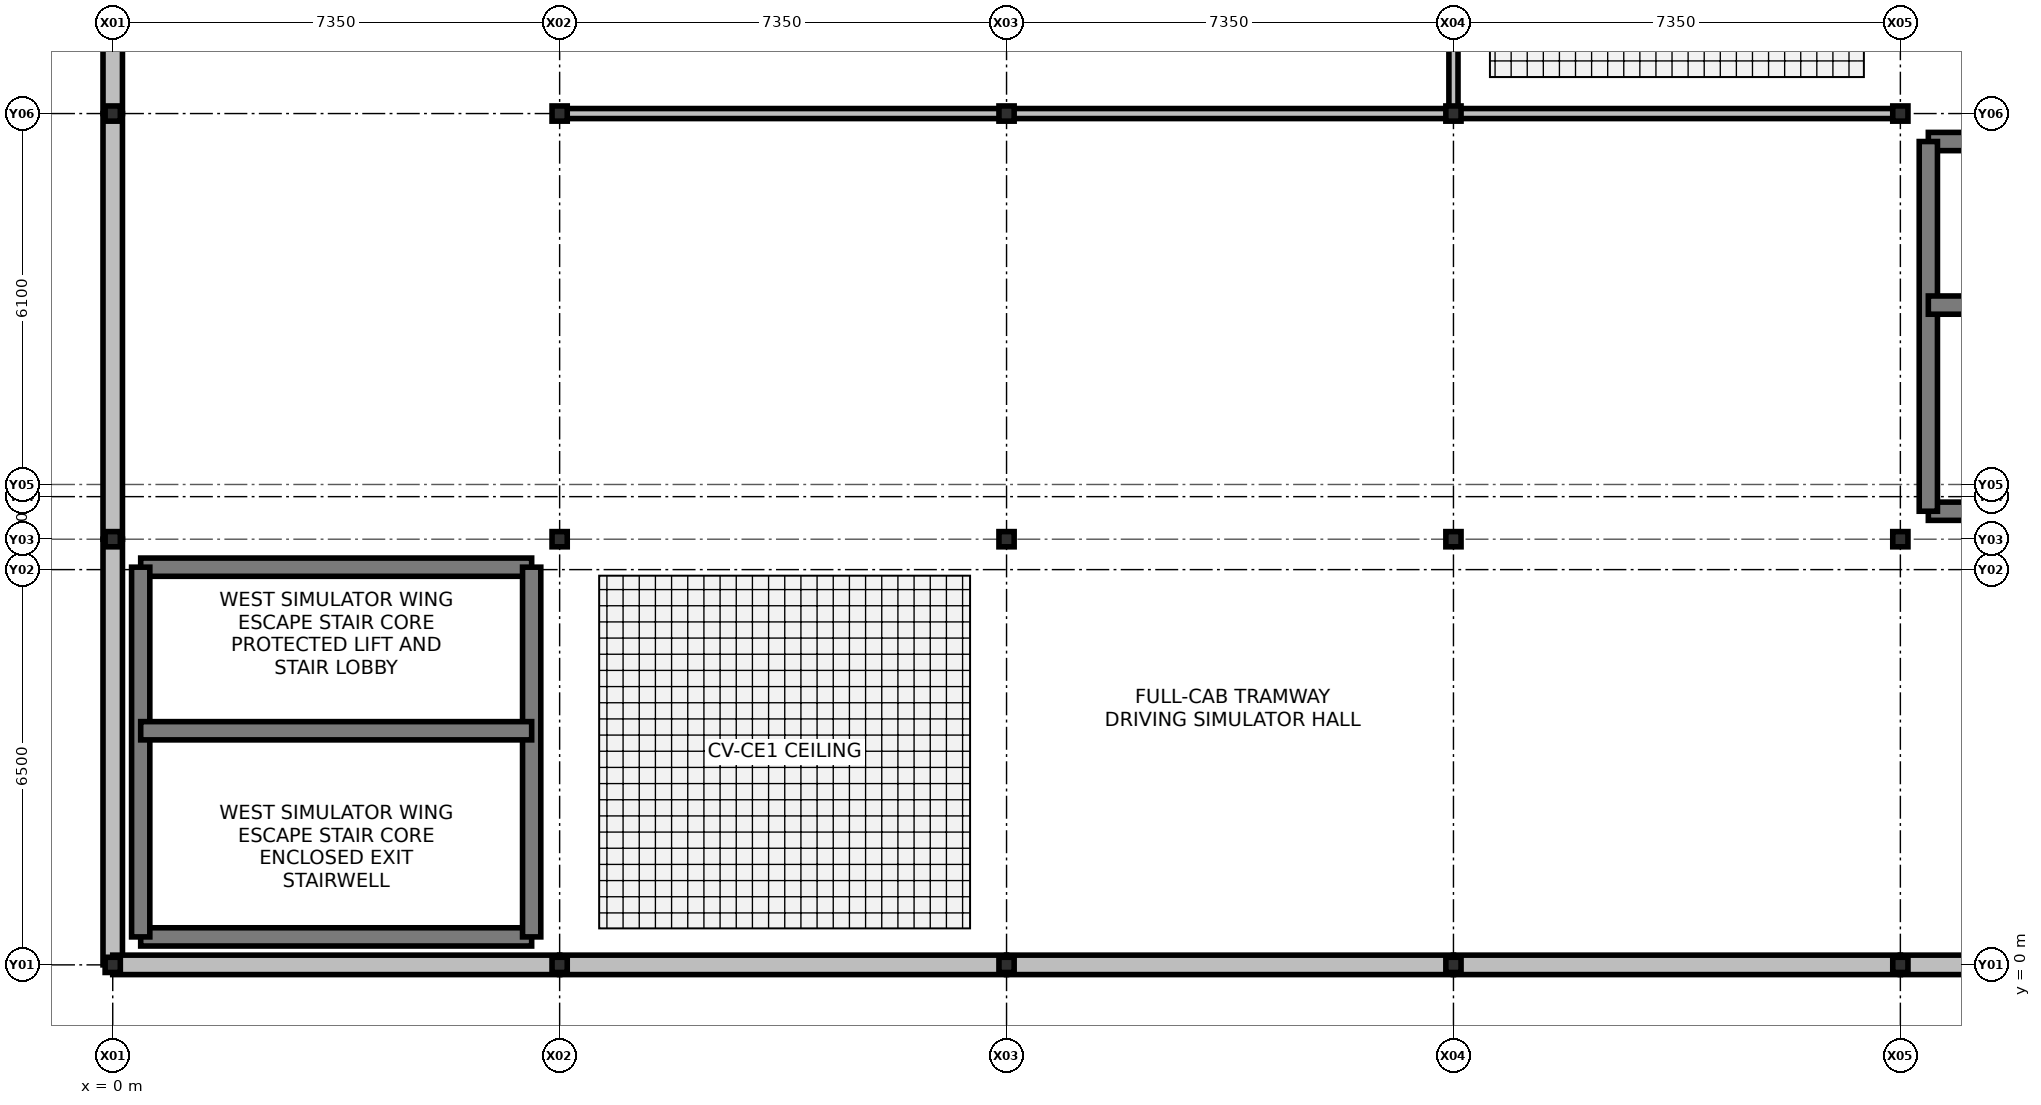
"""IFC4 building model, lengths in metres.
Left out: names, types, materials, properties, quantities, classifications, styles, units other than length and angle.
Written with IfcOpenShell. Run it as: python <this file> out.ifc"""

import sys

from ifc_helpers import new_model, si_unit, direction, frame, frame_2d, origin, origin_with_axes, origin_2d, place, context, subcontext, project, spatial, rectangle, i_section, extrude, element, fill, save


model = new_model("IFC4")
c1 = context("Model", 3, precision=1e-05, world=origin(), true_north=direction((0.0, 1.0)))
c2 = subcontext(c1, "Body", "Model", "MODEL_VIEW")
j1 = project(units=[si_unit("LENGTHUNIT", "METRE"), si_unit("PLANEANGLEUNIT", "RADIAN")], contexts=[c1])
p1 = place(None, origin())
s1 = spatial("IfcSite", under=j1, at=p1, CompositionType="ELEMENT")
p2 = place(p1, origin())
s2 = spatial("IfcBuilding", under=s1, at=p2, CompositionType="ELEMENT")
p3 = place(p2, frame((0.0, 0.0, 15.3)))
s3 = spatial("IfcBuildingStorey", under=s2, at=p3, CompositionType="ELEMENT", Elevation=15.3)
for number, where, z_axis, x_axis in (
    (1, (0.0, 0.0, 0.0), (0.0, 0.0, 1.0), (1.0, 0.0, 0.0)),
    (2, (0.0, 7.0, 0.0), (0.0, 0.0, 1.0), (1.0, 0.0, 0.0)),
    (3, (0.0, 14.0, 0.0), (0.0, 0.0, 1.0), (1.0, 0.0, 0.0)),
    (4, (7.35, 0.0, 0.0), (0.0, 0.0, 1.0), (1.0, 0.0, 0.0)),
    (5, (7.35, 7.0, 0.0), (0.0, 0.0, 1.0), (1.0, 0.0, 0.0)),
    (6, (7.35, 14.0, 0.0), (0.0, 0.0, 1.0), (1.0, 0.0, 0.0)),
    (7, (14.7, 0.0, 0.0), (0.0, 0.0, 1.0), (1.0, 0.0, 0.0)),
    (8, (14.7, 7.0, 0.0), (0.0, 0.0, 1.0), (1.0, 0.0, 0.0)),
    (9, (14.7, 14.0, 0.0), (0.0, 0.0, 1.0), (1.0, 0.0, 0.0)),
    (10, (22.05, 0.0, 0.0), (0.0, 0.0, 1.0), (1.0, 0.0, 0.0)),
    (11, (22.05, 7.0, 0.0), (0.0, 0.0, 1.0), (1.0, 0.0, 0.0)),
    (12, (22.05, 14.0, 0.0), (0.0, 0.0, 1.0), (1.0, 0.0, 0.0)),
    (13, (29.4, 0.0, 0.0), (0.0, 0.0, 1.0), (1.0, 0.0, 0.0)),
    (14, (29.4, 7.0, 0.0), (0.0, 0.0, 1.0), (1.0, 0.0, 0.0)),
    (15, (29.4, 14.0, 0.0), (0.0, 0.0, 1.0), (1.0, 0.0, 0.0)),
):
    element("IfcColumn", number, at=place(p3, frame(where, z_axis=z_axis, x_axis=x_axis)), inside=s3, PredefinedType="COLUMN", context=c2, shape_type="SweptSolid", body=[
        extrude(i_section(OverallWidth=0.25, OverallDepth=0.25, WebThickness=0.009, FlangeThickness=0.014, at=origin_2d()), origin(), (0.0, 0.0, 1.0), 4.2),
    ])
p4 = place(p3, frame((0.0, 0.0, 0.0), z_axis=(0.0, 0.0, 1.0), x_axis=(0.0, 1.0, 0.0)))
e16 = element("IfcWall", 16, at=p4, inside=s3, PredefinedType="SOLIDWALL", context=c2, shape_type="SweptSolid", body=[
    extrude(rectangle(XDim=7.0, YDim=0.32, at=frame_2d((3.5, 0.0))), origin(), (0.0, 0.0, 1.0), 3.45),
])
p5 = place(p4, frame((2.2, 0.0, 0.9)))
e17 = element("IfcOpeningElement", 17, at=p5, cuts=e16, PredefinedType="OPENING", context=c2, shape_type="SweptSolid", body=[
    extrude(rectangle(XDim=2.45, YDim=2.05, at=frame_2d((1.225, 1.025))), frame((0.0, 0.17, 0.0), z_axis=(0.0, -1.0, 0.0), x_axis=(1.0, 0.0, 0.0)), (0.0, 0.0, 1.0), 0.34),
])
p6 = place(p3, frame((0.0, 7.0, 0.0), z_axis=(0.0, 0.0, 1.0), x_axis=(0.0, 1.0, 0.0)))
e18 = element("IfcWall", 18, at=p6, inside=s3, PredefinedType="SOLIDWALL", context=c2, shape_type="SweptSolid", body=[
    extrude(rectangle(XDim=7.0, YDim=0.32, at=frame_2d((3.5, 0.0))), origin(), (0.0, 0.0, 1.0), 3.45),
])
p7 = place(p6, frame((2.2, 0.0, 0.9)))
e19 = element("IfcOpeningElement", 19, at=p7, cuts=e18, PredefinedType="OPENING", context=c2, shape_type="SweptSolid", body=[
    extrude(rectangle(XDim=3.15, YDim=1.95, at=frame_2d((1.575, 0.975))), frame((0.0, 0.17, 0.0), z_axis=(0.0, -1.0, 0.0), x_axis=(1.0, 0.0, 0.0)), (0.0, 0.0, 1.0), 0.34),
])
p8 = place(p3, frame((0.0, 14.0, 0.0), z_axis=(0.0, 0.0, 1.0), x_axis=(0.0, 1.0, 0.0)))
e20 = element("IfcWall", 20, at=p8, inside=s3, PredefinedType="SOLIDWALL", context=c2, shape_type="SweptSolid", body=[
    extrude(rectangle(XDim=7.0, YDim=0.32, at=frame_2d((3.5, 0.0))), origin(), (0.0, 0.0, 1.0), 3.45),
])
p9 = place(p8, frame((2.2, 0.0, 0.9)))
e21 = element("IfcOpeningElement", 21, at=p9, cuts=e20, PredefinedType="OPENING", context=c2, shape_type="SweptSolid", body=[
    extrude(rectangle(XDim=1.4, YDim=1.6, at=frame_2d((0.7, 0.8))), frame((0.0, 0.17, 0.0), z_axis=(0.0, -1.0, 0.0), x_axis=(1.0, 0.0, 0.0)), (0.0, 0.0, 1.0), 0.34),
])
p10 = place(p3, origin_with_axes())
e22 = element("IfcWall", 22, at=p10, inside=s3, PredefinedType="SOLIDWALL", context=c2, shape_type="SweptSolid", body=[
    extrude(rectangle(XDim=7.35, YDim=0.32, at=frame_2d((3.675, 0.0))), origin(), (0.0, 0.0, 1.0), 3.45),
])
p11 = place(p10, frame((2.4, 0.0, 0.9)))
e23 = element("IfcOpeningElement", 23, at=p11, cuts=e22, PredefinedType="OPENING", context=c2, shape_type="SweptSolid", body=[
    extrude(rectangle(XDim=2.1, YDim=2.1, at=frame_2d((1.05, 1.05))), frame((0.0, 0.17, 0.0), z_axis=(0.0, -1.0, 0.0), x_axis=(1.0, 0.0, 0.0)), (0.0, 0.0, 1.0), 0.34),
])
p12 = place(p3, frame((7.35, 0.0, 0.0), z_axis=(0.0, 0.0, 1.0), x_axis=(1.0, 0.0, 0.0)))
e24 = element("IfcWall", 24, at=p12, inside=s3, PredefinedType="SOLIDWALL", context=c2, shape_type="SweptSolid", body=[
    extrude(rectangle(XDim=7.35, YDim=0.32, at=frame_2d((3.675, 0.0))), origin(), (0.0, 0.0, 1.0), 3.45),
])
p13 = place(p12, frame((2.4, 0.0, 0.9)))
e25 = element("IfcOpeningElement", 25, at=p13, cuts=e24, PredefinedType="OPENING", context=c2, shape_type="SweptSolid", body=[
    extrude(rectangle(XDim=2.4, YDim=1.8, at=frame_2d((1.2, 0.9))), frame((0.0, 0.17, 0.0), z_axis=(0.0, -1.0, 0.0), x_axis=(1.0, 0.0, 0.0)), (0.0, 0.0, 1.0), 0.34),
])
p14 = place(p3, frame((14.7, 0.0, 0.0), z_axis=(0.0, 0.0, 1.0), x_axis=(1.0, 0.0, 0.0)))
e26 = element("IfcWall", 26, at=p14, inside=s3, PredefinedType="SOLIDWALL", context=c2, shape_type="SweptSolid", body=[
    extrude(rectangle(XDim=7.35, YDim=0.32, at=frame_2d((3.675, 0.0))), origin(), (0.0, 0.0, 1.0), 3.45),
])
p15 = place(p14, frame((2.4, 0.0, 0.9)))
e27 = element("IfcOpeningElement", 27, at=p15, cuts=e26, PredefinedType="OPENING", context=c2, shape_type="SweptSolid", body=[
    extrude(rectangle(XDim=2.4, YDim=2.1, at=frame_2d((1.2, 1.05))), frame((0.0, 0.17, 0.0), z_axis=(0.0, -1.0, 0.0), x_axis=(1.0, 0.0, 0.0)), (0.0, 0.0, 1.0), 0.34),
])
p16 = place(p3, frame((22.05, 0.0, 0.0), z_axis=(0.0, 0.0, 1.0), x_axis=(1.0, 0.0, 0.0)))
e28 = element("IfcWall", 28, at=p16, inside=s3, PredefinedType="SOLIDWALL", context=c2, shape_type="SweptSolid", body=[
    extrude(rectangle(XDim=7.35, YDim=0.32, at=frame_2d((3.675, 0.0))), origin(), (0.0, 0.0, 1.0), 3.45),
])
p17 = place(p16, frame((2.4, 0.0, 0.9)))
e29 = element("IfcOpeningElement", 29, at=p17, cuts=e28, PredefinedType="OPENING", context=c2, shape_type="SweptSolid", body=[
    extrude(rectangle(XDim=2.6, YDim=2.0, at=frame_2d((1.3, 1.0))), frame((0.0, 0.17, 0.0), z_axis=(0.0, -1.0, 0.0), x_axis=(1.0, 0.0, 0.0)), (0.0, 0.0, 1.0), 0.34),
])
p18 = place(p3, frame((29.4, 0.0, 0.0), z_axis=(0.0, 0.0, 1.0), x_axis=(1.0, 0.0, 0.0)))
e30 = element("IfcWall", 30, at=p18, inside=s3, PredefinedType="SOLIDWALL", context=c2, shape_type="SweptSolid", body=[
    extrude(rectangle(XDim=7.35, YDim=0.32, at=frame_2d((3.675, 0.0))), origin(), (0.0, 0.0, 1.0), 3.45),
])
p19 = place(p18, frame((2.4, 0.0, 0.9)))
e31 = element("IfcOpeningElement", 31, at=p19, cuts=e30, PredefinedType="OPENING", context=c2, shape_type="SweptSolid", body=[
    extrude(rectangle(XDim=2.8, YDim=2.1, at=frame_2d((1.4, 1.05))), frame((0.0, 0.17, 0.0), z_axis=(0.0, -1.0, 0.0), x_axis=(1.0, 0.0, 0.0)), (0.0, 0.0, 1.0), 0.34),
])
p20 = place(p3, frame((29.86, 7.46, 0.0), z_axis=(0.0, 0.0, 1.0), x_axis=(1.0, 0.0, 0.0)))
e32 = element("IfcWall", 32, at=p20, inside=s3, PredefinedType="SHEAR", context=c2, shape_type="SweptSolid", body=[
    extrude(rectangle(XDim=6.43, YDim=0.3, at=frame_2d((3.215, 0.0))), origin(), (0.0, 0.0, 1.0), 3.92),
])
p21 = place(p3, frame((29.86, 13.54, 0.0), z_axis=(0.0, 0.0, 1.0), x_axis=(1.0, 0.0, 0.0)))
e33 = element("IfcWall", 33, at=p21, inside=s3, PredefinedType="SHEAR", context=c2, shape_type="SweptSolid", body=[
    extrude(rectangle(XDim=6.43, YDim=0.3, at=frame_2d((3.215, 0.0))), origin(), (0.0, 0.0, 1.0), 3.92),
])
p22 = place(p21, frame((0.55, 0.0, 0.0)))
e34 = element("IfcOpeningElement", 34, at=p22, cuts=e33, PredefinedType="OPENING", context=c2, shape_type="SweptSolid", body=[
    extrude(rectangle(XDim=1.5, YDim=2.2, at=frame_2d((0.75, 1.1))), frame((0.0, 0.16, 0.0), z_axis=(0.0, -1.0, 0.0), x_axis=(1.0, 0.0, 0.0)), (0.0, 0.0, 1.0), 0.32),
])
p23 = place(p3, frame((29.86, 7.46, 0.0), z_axis=(0.0, 0.0, 1.0), x_axis=(0.0, 1.0, 0.0)))
e35 = element("IfcWall", 35, at=p23, inside=s3, PredefinedType="SHEAR", context=c2, shape_type="SweptSolid", body=[
    extrude(rectangle(XDim=6.08, YDim=0.3, at=frame_2d((3.04, 0.0))), origin(), (0.0, 0.0, 1.0), 3.92),
])
p24 = place(p3, frame((29.86, 10.85, 0.0), z_axis=(0.0, 0.0, 1.0), x_axis=(1.0, 0.0, 0.0)))
e36 = element("IfcWall", 36, at=p24, inside=s3, PredefinedType="SHEAR", context=c2, shape_type="SweptSolid", body=[
    extrude(rectangle(XDim=6.43, YDim=0.3, at=frame_2d((3.215, 0.0))), origin(), (0.0, 0.0, 1.0), 3.92),
])
p25 = place(p24, frame((0.185, 0.0, 0.0)))
e37 = element("IfcOpeningElement", 37, at=p25, cuts=e36, PredefinedType="OPENING", context=c2, shape_type="SweptSolid", body=[
    extrude(rectangle(XDim=1.05, YDim=2.15, at=frame_2d((0.525, 1.075))), frame((0.0, 0.16, 0.0), z_axis=(0.0, -1.0, 0.0), x_axis=(1.0, 0.0, 0.0)), (0.0, 0.0, 1.0), 0.32),
])
p26 = place(p3, frame((0.46, 0.46, 0.0), z_axis=(0.0, 0.0, 1.0), x_axis=(1.0, 0.0, 0.0)))
e38 = element("IfcWall", 38, at=p26, inside=s3, PredefinedType="SHEAR", context=c2, shape_type="SweptSolid", body=[
    extrude(rectangle(XDim=6.43, YDim=0.3, at=frame_2d((3.215, 0.0))), origin(), (0.0, 0.0, 1.0), 3.92),
])
p27 = place(p3, frame((0.46, 6.54, 0.0), z_axis=(0.0, 0.0, 1.0), x_axis=(1.0, 0.0, 0.0)))
e39 = element("IfcWall", 39, at=p27, inside=s3, PredefinedType="SHEAR", context=c2, shape_type="SweptSolid", body=[
    extrude(rectangle(XDim=6.43, YDim=0.3, at=frame_2d((3.215, 0.0))), origin(), (0.0, 0.0, 1.0), 3.92),
])
p28 = place(p27, frame((0.55, 0.0, 0.0)))
e40 = element("IfcOpeningElement", 40, at=p28, cuts=e39, PredefinedType="OPENING", context=c2, shape_type="SweptSolid", body=[
    extrude(rectangle(XDim=1.5, YDim=2.2, at=frame_2d((0.75, 1.1))), frame((0.0, 0.16, 0.0), z_axis=(0.0, -1.0, 0.0), x_axis=(1.0, 0.0, 0.0)), (0.0, 0.0, 1.0), 0.32),
])
for number, where, z_axis, x_axis in (
    (41, (0.46, 0.46, 0.0), (0.0, 0.0, 1.0), (0.0, 1.0, 0.0)),
    (42, (6.89, 0.46, 0.0), (0.0, 0.0, 1.0), (0.0, 1.0, 0.0)),
):
    element("IfcWall", number, at=place(p3, frame(where, z_axis=z_axis, x_axis=x_axis)), inside=s3, PredefinedType="SHEAR", context=c2, shape_type="SweptSolid", body=[
        extrude(rectangle(XDim=6.08, YDim=0.3, at=frame_2d((3.04, 0.0))), origin(), (0.0, 0.0, 1.0), 3.92),
    ])
p29 = place(p3, frame((0.46, 3.85, 0.0), z_axis=(0.0, 0.0, 1.0), x_axis=(1.0, 0.0, 0.0)))
e43 = element("IfcWall", 43, at=p29, inside=s3, PredefinedType="SHEAR", context=c2, shape_type="SweptSolid", body=[
    extrude(rectangle(XDim=6.43, YDim=0.3, at=frame_2d((3.215, 0.0))), origin(), (0.0, 0.0, 1.0), 3.92),
])
p30 = place(p29, frame((0.185, 0.0, 0.0)))
e44 = element("IfcOpeningElement", 44, at=p30, cuts=e43, PredefinedType="OPENING", context=c2, shape_type="SweptSolid", body=[
    extrude(rectangle(XDim=1.05, YDim=2.15, at=frame_2d((0.525, 1.075))), frame((0.0, 0.16, 0.0), z_axis=(0.0, -1.0, 0.0), x_axis=(1.0, 0.0, 0.0)), (0.0, 0.0, 1.0), 0.32),
])
p31 = place(p3, frame((7.35, 14.0, 0.0), z_axis=(0.0, 0.0, 1.0), x_axis=(1.0, 0.0, 0.0)))
e45 = element("IfcWall", 45, at=p31, inside=s3, PredefinedType="PARTITIONING", context=c2, shape_type="SweptSolid", body=[
    extrude(rectangle(XDim=22.05, YDim=0.165, at=frame_2d((11.025, 0.0))), origin(), (0.0, 0.0, 1.0), 3.2),
])
p32 = place(p31, frame((4.0, 0.0, 0.0)))
e46 = element("IfcOpeningElement", 46, at=p32, cuts=e45, PredefinedType="OPENING", context=c2, shape_type="SweptSolid", body=[
    extrude(rectangle(XDim=1.7, YDim=2.25, at=frame_2d((0.85, 1.125))), frame((0.0, 0.092, 0.0), z_axis=(0.0, -1.0, 0.0), x_axis=(1.0, 0.0, 0.0)), (0.0, 0.0, 1.0), 0.185),
])
p33 = place(p3, frame((22.05, 14.0, 0.0), z_axis=(0.0, 0.0, 1.0), x_axis=(0.0, 1.0, 0.0)))
e47 = element("IfcWall", 47, at=p33, inside=s3, PredefinedType="PARTITIONING", context=c2, shape_type="SweptSolid", body=[
    extrude(rectangle(XDim=21.0, YDim=0.15, at=frame_2d((10.5, 0.0))), origin(), (0.0, 0.0, 1.0), 3.2),
])
p34 = place(p33, frame((4.0, 0.0, 0.0)))
e48 = element("IfcOpeningElement", 48, at=p34, cuts=e47, PredefinedType="OPENING", context=c2, shape_type="SweptSolid", body=[
    extrude(rectangle(XDim=1.25, YDim=2.15, at=frame_2d((0.625, 1.075))), frame((0.0, 0.085, 0.0), z_axis=(0.0, -1.0, 0.0), x_axis=(1.0, 0.0, 0.0)), (0.0, 0.0, 1.0), 0.17),
])
p35 = place(p33, frame((17.5, 0.0, 0.0)))
e49 = element("IfcOpeningElement", 49, at=p35, cuts=e47, PredefinedType="OPENING", context=c2, shape_type="SweptSolid", body=[
    extrude(rectangle(XDim=1.15, YDim=2.15, at=frame_2d((0.575, 1.075))), frame((0.0, 0.085, 0.0), z_axis=(0.0, -1.0, 0.0), x_axis=(1.0, 0.0, 0.0)), (0.0, 0.0, 1.0), 0.17),
])
p36 = place(p5, origin())
e50 = element("IfcWindow", 50, at=p36, inside=s3, PartitioningType="SINGLE_PANEL", PredefinedType="WINDOW", context=c2, shape_type="SweptSolid", body=[
    extrude(rectangle(XDim=2.45, YDim=2.05, at=frame_2d((1.225, 1.025))), frame((0.0, 0.03, 0.0), z_axis=(0.0, -1.0, 0.0), x_axis=(1.0, 0.0, 0.0)), (0.0, 0.0, 1.0), 0.06),
])
fill(e17, e50)
p37 = place(p7, origin())
e51 = element("IfcWindow", 51, at=p37, inside=s3, PartitioningType="SINGLE_PANEL", PredefinedType="WINDOW", context=c2, shape_type="SweptSolid", body=[
    extrude(rectangle(XDim=3.15, YDim=1.95, at=frame_2d((1.575, 0.975))), frame((0.0, 0.03, 0.0), z_axis=(0.0, -1.0, 0.0), x_axis=(1.0, 0.0, 0.0)), (0.0, 0.0, 1.0), 0.06),
])
fill(e19, e51)
p38 = place(p11, origin())
e52 = element("IfcWindow", 52, at=p38, inside=s3, PartitioningType="SINGLE_PANEL", PredefinedType="WINDOW", context=c2, shape_type="SweptSolid", body=[
    extrude(rectangle(XDim=2.1, YDim=2.1, at=frame_2d((1.05, 1.05))), frame((0.0, 0.03, 0.0), z_axis=(0.0, -1.0, 0.0), x_axis=(1.0, 0.0, 0.0)), (0.0, 0.0, 1.0), 0.06),
])
fill(e23, e52)
p39 = place(p13, origin())
e53 = element("IfcWindow", 53, at=p39, inside=s3, PartitioningType="SINGLE_PANEL", PredefinedType="WINDOW", context=c2, shape_type="SweptSolid", body=[
    extrude(rectangle(XDim=2.4, YDim=1.8, at=frame_2d((1.2, 0.9))), frame((0.0, 0.03, 0.0), z_axis=(0.0, -1.0, 0.0), x_axis=(1.0, 0.0, 0.0)), (0.0, 0.0, 1.0), 0.06),
])
fill(e25, e53)
p40 = place(p15, origin())
e54 = element("IfcWindow", 54, at=p40, inside=s3, PartitioningType="SINGLE_PANEL", PredefinedType="WINDOW", context=c2, shape_type="SweptSolid", body=[
    extrude(rectangle(XDim=2.4, YDim=2.1, at=frame_2d((1.2, 1.05))), frame((0.0, 0.03, 0.0), z_axis=(0.0, -1.0, 0.0), x_axis=(1.0, 0.0, 0.0)), (0.0, 0.0, 1.0), 0.06),
])
fill(e27, e54)
p41 = place(p17, origin())
e55 = element("IfcWindow", 55, at=p41, inside=s3, PartitioningType="SINGLE_PANEL", PredefinedType="WINDOW", context=c2, shape_type="SweptSolid", body=[
    extrude(rectangle(XDim=2.6, YDim=2.0, at=frame_2d((1.3, 1.0))), frame((0.0, 0.03, 0.0), z_axis=(0.0, -1.0, 0.0), x_axis=(1.0, 0.0, 0.0)), (0.0, 0.0, 1.0), 0.06),
])
fill(e29, e55)
p42 = place(p25, origin())
e56 = element("IfcDoor", 56, at=p42, inside=s3, OperationType="SINGLE_SWING_RIGHT", PredefinedType="DOOR", context=c2, shape_type="SweptSolid", body=[
    extrude(rectangle(XDim=1.05, YDim=2.15, at=frame_2d((0.525, 1.075))), frame((0.0, 0.025, 0.0), z_axis=(0.0, -1.0, 0.0), x_axis=(1.0, 0.0, 0.0)), (0.0, 0.0, 1.0), 0.05),
])
fill(e37, e56)
p43 = place(p30, origin())
e57 = element("IfcDoor", 57, at=p43, inside=s3, OperationType="SINGLE_SWING_RIGHT", PredefinedType="DOOR", context=c2, shape_type="SweptSolid", body=[
    extrude(rectangle(XDim=1.05, YDim=2.15, at=frame_2d((0.525, 1.075))), frame((0.0, 0.025, 0.0), z_axis=(0.0, -1.0, 0.0), x_axis=(1.0, 0.0, 0.0)), (0.0, 0.0, 1.0), 0.05),
])
fill(e44, e57)
p44 = place(p28, origin())
e58 = element("IfcDoor", 58, at=p44, inside=s3, OperationType="DOUBLE_DOOR_SINGLE_SWING", PredefinedType="DOOR", context=c2, shape_type="SweptSolid", body=[
    extrude(rectangle(XDim=1.5, YDim=2.2, at=frame_2d((0.75, 1.1))), frame((0.0, 0.025, 0.0), z_axis=(0.0, -1.0, 0.0), x_axis=(1.0, 0.0, 0.0)), (0.0, 0.0, 1.0), 0.05),
])
fill(e40, e58)
p45 = place(p32, origin())
e59 = element("IfcDoor", 59, at=p45, inside=s3, OperationType="DOUBLE_DOOR_SINGLE_SWING", PredefinedType="DOOR", context=c2, shape_type="SweptSolid", body=[
    extrude(rectangle(XDim=1.7, YDim=2.25, at=frame_2d((0.85, 1.125))), frame((0.0, 0.025, 0.0), z_axis=(0.0, -1.0, 0.0), x_axis=(1.0, 0.0, 0.0)), (0.0, 0.0, 1.0), 0.05),
])
fill(e46, e59)
save(model, sys.argv[1])
